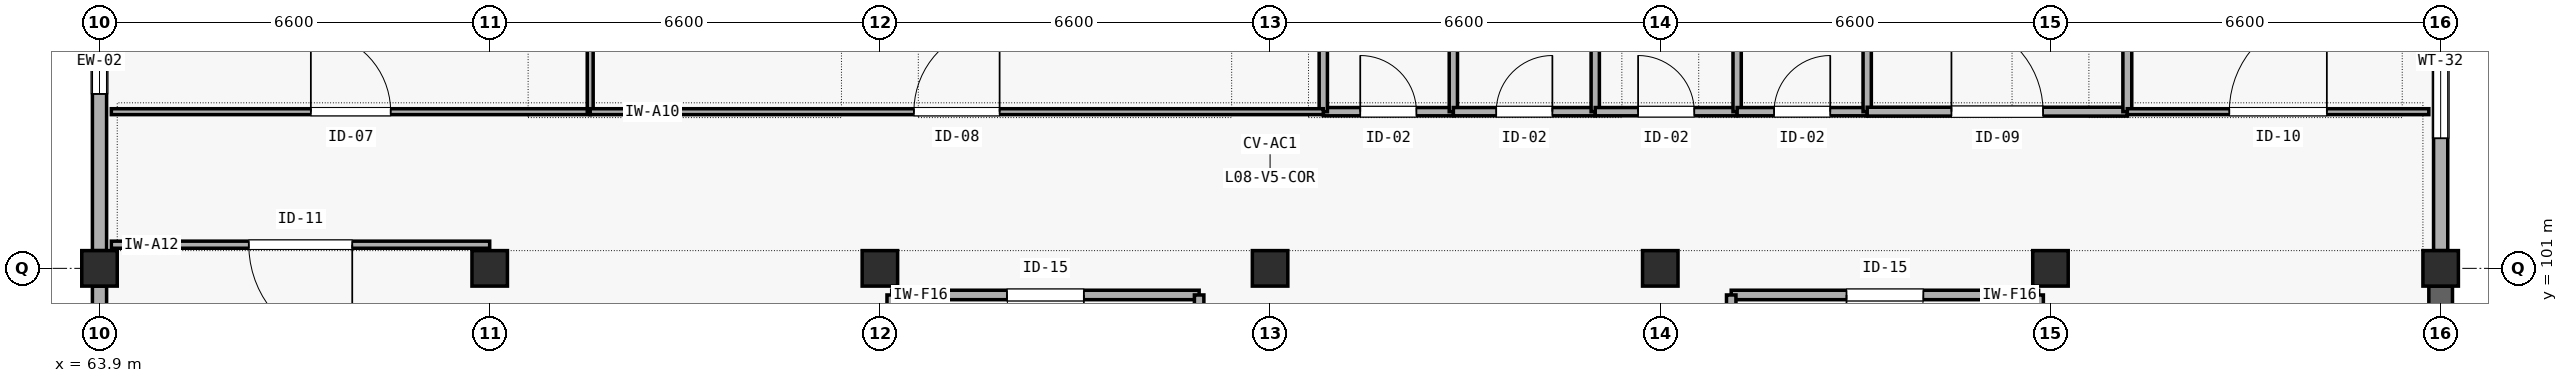
"""IFC4 building model, lengths in metres.
Left out: names, types, materials, properties, quantities, classifications, styles, units other than length and angle.
Written with IfcOpenShell. Run it as: python <this file> out.ifc"""

import sys

from ifc_helpers import new_model, si_unit, direction, frame, frame_2d, origin, origin_2d, place, context, subcontext, project, spatial, rectangle, extrude, element, fill, save


model = new_model("IFC4")
c1 = context("Model", 3, precision=1e-05, world=origin(), true_north=direction((0.0, 1.0)))
c2 = subcontext(c1, "Body", "Model", "MODEL_VIEW")
j1 = project(units=[si_unit("LENGTHUNIT", "METRE"), si_unit("PLANEANGLEUNIT", "RADIAN")], contexts=[c1])
p1 = place(None, origin())
s1 = spatial("IfcSite", under=j1, at=p1, CompositionType="ELEMENT")
p2 = place(p1, origin())
s2 = spatial("IfcBuilding", under=s1, at=p2, CompositionType="ELEMENT")
p3 = place(p2, frame((0.0, 0.0, 33.6)))
s3 = spatial("IfcBuildingStorey", under=s2, at=p3, CompositionType="ELEMENT", Elevation=33.6)
for number, where, z_axis, x_axis in (
    (1, (63.9, 101.0, 0.0), (0.0, 0.0, 1.0), (1.0, 0.0, 0.0)),
    (2, (70.5, 101.0, 0.0), (0.0, 0.0, 1.0), (1.0, 0.0, 0.0)),
    (3, (77.1, 101.0, 0.0), (0.0, 0.0, 1.0), (1.0, 0.0, 0.0)),
    (4, (83.7, 101.0, 0.0), (0.0, 0.0, 1.0), (1.0, 0.0, 0.0)),
    (5, (90.3, 101.0, 0.0), (0.0, 0.0, 1.0), (1.0, 0.0, 0.0)),
    (6, (96.9, 101.0, 0.0), (0.0, 0.0, 1.0), (1.0, 0.0, 0.0)),
    (7, (103.5, 101.0, 0.0), (0.0, 0.0, 1.0), (1.0, 0.0, 0.0)),
):
    element("IfcColumn", number, at=place(p3, frame(where, z_axis=z_axis, x_axis=x_axis)), inside=s3, PredefinedType="COLUMN", context=c2, shape_type="SweptSolid", body=[
        extrude(rectangle(XDim=0.6, YDim=0.6, at=origin_2d()), origin(), (0.0, 0.0, 1.0), 4.2),
    ])
p4 = place(p3, frame((63.9, 94.3, 0.0), z_axis=(0.0, 0.0, 1.0), x_axis=(0.0, 1.0, 0.0)))
e8 = element("IfcWall", 8, at=p4, inside=s3, PredefinedType="SOLIDWALL", context=c2, shape_type="SweptSolid", body=[
    extrude(rectangle(XDim=6.4, YDim=0.24, at=frame_2d((3.2, 0.0))), origin(), (0.0, 0.0, 1.0), 3.505),
])
p5 = place(p4, frame((1.7, 0.0, 0.85)))
e9 = element("IfcOpeningElement", 9, at=p5, cuts=e8, PredefinedType="OPENING", context=c2, shape_type="SweptSolid", body=[
    extrude(rectangle(XDim=3.0, YDim=1.6, at=frame_2d((1.5, 0.8))), frame((0.0, 0.13, 0.0), z_axis=(0.0, -1.0, 0.0), x_axis=(1.0, 0.0, 0.0)), (0.0, 0.0, 1.0), 0.26),
])
p6 = place(p3, frame((63.9, 101.3, 0.0), z_axis=(0.0, 0.0, 1.0), x_axis=(0.0, 1.0, 0.0)))
e10 = element("IfcWall", 10, at=p6, inside=s3, PredefinedType="SOLIDWALL", context=c2, shape_type="SweptSolid", body=[
    extrude(rectangle(XDim=6.4, YDim=0.24, at=frame_2d((3.2, 0.0))), origin(), (0.0, 0.0, 1.0), 3.505),
])
p7 = place(p6, frame((2.65, 0.0, 0.85)))
e11 = element("IfcOpeningElement", 11, at=p7, cuts=e10, PredefinedType="OPENING", context=c2, shape_type="SweptSolid", body=[
    extrude(rectangle(XDim=1.1, YDim=1.45, at=frame_2d((0.55, 0.725))), frame((0.0, 0.13, 0.0), z_axis=(0.0, -1.0, 0.0), x_axis=(1.0, 0.0, 0.0)), (0.0, 0.0, 1.0), 0.26),
])
p8 = place(p3, frame((103.5, 97.96, 0.0), z_axis=(0.0, 0.0, 1.0), x_axis=(0.0, 1.0, 0.0)))
e12 = element("IfcWall", 12, at=p8, inside=s3, PredefinedType="SHEAR", context=c2, shape_type="SweptSolid", body=[
    extrude(rectangle(XDim=2.74, YDim=0.4, at=frame_2d((1.37, 0.0))), origin(), (0.0, 0.0, 1.0), 3.85),
])
p9 = place(p3, frame((103.5, 101.3, 0.0), z_axis=(0.0, 0.0, 1.0), x_axis=(0.0, 1.0, 0.0)))
e13 = element("IfcWall", 13, at=p9, inside=s3, PredefinedType="SOLIDWALL", context=c2, shape_type="SweptSolid", body=[
    extrude(rectangle(XDim=6.4, YDim=0.24, at=frame_2d((3.2, 0.0))), origin(), (0.0, 0.0, 1.0), 3.465),
])
p10 = place(p9, frame((1.9, 0.0, 0.85)))
e14 = element("IfcOpeningElement", 14, at=p10, cuts=e13, PredefinedType="OPENING", context=c2, shape_type="SweptSolid", body=[
    extrude(rectangle(XDim=2.6, YDim=1.2, at=frame_2d((1.3, 0.6))), frame((0.0, 0.13, 0.0), z_axis=(0.0, -1.0, 0.0), x_axis=(1.0, 0.0, 0.0)), (0.0, 0.0, 1.0), 0.26),
])
p11 = place(p3, frame((77.3, 100.55, 0.0), z_axis=(0.0, 0.0, 1.0), x_axis=(1.0, 0.0, 0.0)))
e15 = element("IfcWall", 15, at=p11, inside=s3, PredefinedType="SOLIDWALL", context=c2, shape_type="SweptSolid", body=[
    extrude(rectangle(XDim=5.2, YDim=0.16, at=frame_2d((2.6, 0.0))), origin(), (0.0, 0.0, 1.0), 3.9),
])
p12 = place(p11, frame((1.95, 0.0, 0.0)))
e16 = element("IfcOpeningElement", 16, at=p12, cuts=e15, PredefinedType="OPENING", context=c2, shape_type="SweptSolid", body=[
    extrude(rectangle(XDim=1.3, YDim=2.15, at=frame_2d((0.65, 1.075))), frame((0.0, 0.09, 0.0), z_axis=(0.0, -1.0, 0.0), x_axis=(1.0, 0.0, 0.0)), (0.0, 0.0, 1.0), 0.18),
])
p13 = place(p3, frame((77.3, 97.5, 0.0), z_axis=(0.0, 0.0, 1.0), x_axis=(0.0, 1.0, 0.0)))
e17 = element("IfcWall", 17, at=p13, inside=s3, PredefinedType="SOLIDWALL", context=c2, shape_type="SweptSolid", body=[
    extrude(rectangle(XDim=3.05, YDim=0.16, at=frame_2d((1.525, 0.0))), origin(), (0.0, 0.0, 1.0), 3.405),
])
p14 = place(p3, frame((82.5, 97.5, 0.0), z_axis=(0.0, 0.0, 1.0), x_axis=(0.0, 1.0, 0.0)))
e18 = element("IfcWall", 18, at=p14, inside=s3, PredefinedType="SOLIDWALL", context=c2, shape_type="SweptSolid", body=[
    extrude(rectangle(XDim=3.05, YDim=0.16, at=frame_2d((1.525, 0.0))), origin(), (0.0, 0.0, 1.0), 3.9),
])
p15 = place(p3, frame((91.5, 100.55, 0.0), z_axis=(0.0, 0.0, 1.0), x_axis=(1.0, 0.0, 0.0)))
e19 = element("IfcWall", 19, at=p15, inside=s3, PredefinedType="SOLIDWALL", context=c2, shape_type="SweptSolid", body=[
    extrude(rectangle(XDim=5.2, YDim=0.16, at=frame_2d((2.6, 0.0))), origin(), (0.0, 0.0, 1.0), 3.9),
])
p16 = place(p15, frame((1.95, 0.0, 0.0)))
e20 = element("IfcOpeningElement", 20, at=p16, cuts=e19, PredefinedType="OPENING", context=c2, shape_type="SweptSolid", body=[
    extrude(rectangle(XDim=1.3, YDim=2.15, at=frame_2d((0.65, 1.075))), frame((0.0, 0.09, 0.0), z_axis=(0.0, -1.0, 0.0), x_axis=(1.0, 0.0, 0.0)), (0.0, 0.0, 1.0), 0.18),
])
p17 = place(p3, frame((91.5, 97.5, 0.0), z_axis=(0.0, 0.0, 1.0), x_axis=(0.0, 1.0, 0.0)))
e21 = element("IfcWall", 21, at=p17, inside=s3, PredefinedType="SOLIDWALL", context=c2, shape_type="SweptSolid", body=[
    extrude(rectangle(XDim=3.05, YDim=0.16, at=frame_2d((1.525, 0.0))), origin(), (0.0, 0.0, 1.0), 3.9),
])
p18 = place(p3, frame((96.7, 97.5, 0.0), z_axis=(0.0, 0.0, 1.0), x_axis=(0.0, 1.0, 0.0)))
e22 = element("IfcWall", 22, at=p18, inside=s3, PredefinedType="SOLIDWALL", context=c2, shape_type="SweptSolid", body=[
    extrude(rectangle(XDim=3.05, YDim=0.16, at=frame_2d((1.525, 0.0))), origin(), (0.0, 0.0, 1.0), 3.405),
])
p19 = place(p3, frame((84.6, 103.65, 0.0), z_axis=(0.0, 0.0, 1.0), x_axis=(1.0, 0.0, 0.0)))
e23 = element("IfcWall", 23, at=p19, inside=s3, PredefinedType="PLUMBINGWALL", context=c2, shape_type="SweptSolid", body=[
    extrude(rectangle(XDim=2.2, YDim=0.14, at=frame_2d((1.1, 0.0))), origin(), (0.0, 0.0, 1.0), 3.9),
])
p20 = place(p19, frame((0.625, 0.0, 0.0)))
e24 = element("IfcOpeningElement", 24, at=p20, cuts=e23, PredefinedType="OPENING", context=c2, shape_type="SweptSolid", body=[
    extrude(rectangle(XDim=0.95, YDim=2.1, at=frame_2d((0.475, 1.05))), frame((0.0, 0.08, 0.0), z_axis=(0.0, -1.0, 0.0), x_axis=(1.0, 0.0, 0.0)), (0.0, 0.0, 1.0), 0.16),
])
for number, where, z_axis, x_axis in (
    (25, (84.6, 103.65, 0.0), (0.0, 0.0, 1.0), (0.0, 1.0, 0.0)),
    (26, (86.8, 103.65, 0.0), (0.0, 0.0, 1.0), (0.0, 1.0, 0.0)),
):
    element("IfcWall", number, at=place(p3, frame(where, z_axis=z_axis, x_axis=x_axis)), inside=s3, PredefinedType="PLUMBINGWALL", context=c2, shape_type="SweptSolid", body=[
        extrude(rectangle(XDim=4.15, YDim=0.14, at=frame_2d((2.075, 0.0))), origin(), (0.0, 0.0, 1.0), 3.9),
    ])
p21 = place(p3, frame((86.8, 103.65, 0.0), z_axis=(0.0, 0.0, 1.0), x_axis=(1.0, 0.0, 0.0)))
e27 = element("IfcWall", 27, at=p21, inside=s3, PredefinedType="PLUMBINGWALL", context=c2, shape_type="SweptSolid", body=[
    extrude(rectangle(XDim=2.4, YDim=0.14, at=frame_2d((1.2, 0.0))), origin(), (0.0, 0.0, 1.0), 3.9),
])
p22 = place(p21, frame((0.725, 0.0, 0.0)))
e28 = element("IfcOpeningElement", 28, at=p22, cuts=e27, PredefinedType="OPENING", context=c2, shape_type="SweptSolid", body=[
    extrude(rectangle(XDim=0.95, YDim=2.1, at=frame_2d((0.475, 1.05))), frame((0.0, 0.08, 0.0), z_axis=(0.0, -1.0, 0.0), x_axis=(1.0, 0.0, 0.0)), (0.0, 0.0, 1.0), 0.16),
])
p23 = place(p3, frame((89.2, 103.65, 0.0), z_axis=(0.0, 0.0, 1.0), x_axis=(0.0, 1.0, 0.0)))
e29 = element("IfcWall", 29, at=p23, inside=s3, PredefinedType="PLUMBINGWALL", context=c2, shape_type="SweptSolid", body=[
    extrude(rectangle(XDim=4.15, YDim=0.14, at=frame_2d((2.075, 0.0))), origin(), (0.0, 0.0, 1.0), 3.9),
])
p24 = place(p3, frame((89.2, 103.65, 0.0), z_axis=(0.0, 0.0, 1.0), x_axis=(1.0, 0.0, 0.0)))
e30 = element("IfcWall", 30, at=p24, inside=s3, PredefinedType="PLUMBINGWALL", context=c2, shape_type="SweptSolid", body=[
    extrude(rectangle(XDim=2.4, YDim=0.14, at=frame_2d((1.2, 0.0))), origin(), (0.0, 0.0, 1.0), 3.9),
])
p25 = place(p24, frame((0.725, 0.0, 0.0)))
e31 = element("IfcOpeningElement", 31, at=p25, cuts=e30, PredefinedType="OPENING", context=c2, shape_type="SweptSolid", body=[
    extrude(rectangle(XDim=0.95, YDim=2.1, at=frame_2d((0.475, 1.05))), frame((0.0, 0.08, 0.0), z_axis=(0.0, -1.0, 0.0), x_axis=(1.0, 0.0, 0.0)), (0.0, 0.0, 1.0), 0.16),
])
p26 = place(p3, frame((91.6, 103.65, 0.0), z_axis=(0.0, 0.0, 1.0), x_axis=(0.0, 1.0, 0.0)))
e32 = element("IfcWall", 32, at=p26, inside=s3, PredefinedType="PLUMBINGWALL", context=c2, shape_type="SweptSolid", body=[
    extrude(rectangle(XDim=4.15, YDim=0.14, at=frame_2d((2.075, 0.0))), origin(), (0.0, 0.0, 1.0), 3.9),
])
p27 = place(p3, frame((91.6, 103.65, 0.0), z_axis=(0.0, 0.0, 1.0), x_axis=(1.0, 0.0, 0.0)))
e33 = element("IfcWall", 33, at=p27, inside=s3, PredefinedType="PLUMBINGWALL", context=c2, shape_type="SweptSolid", body=[
    extrude(rectangle(XDim=2.2, YDim=0.14, at=frame_2d((1.1, 0.0))), origin(), (0.0, 0.0, 1.0), 3.9),
])
p28 = place(p27, frame((0.625, 0.0, 0.0)))
e34 = element("IfcOpeningElement", 34, at=p28, cuts=e33, PredefinedType="OPENING", context=c2, shape_type="SweptSolid", body=[
    extrude(rectangle(XDim=0.95, YDim=2.1, at=frame_2d((0.475, 1.05))), frame((0.0, 0.08, 0.0), z_axis=(0.0, -1.0, 0.0), x_axis=(1.0, 0.0, 0.0)), (0.0, 0.0, 1.0), 0.16),
])
p29 = place(p3, frame((93.8, 103.65, 0.0), z_axis=(0.0, 0.0, 1.0), x_axis=(0.0, 1.0, 0.0)))
e35 = element("IfcWall", 35, at=p29, inside=s3, PredefinedType="PLUMBINGWALL", context=c2, shape_type="SweptSolid", body=[
    extrude(rectangle(XDim=4.15, YDim=0.14, at=frame_2d((2.075, 0.0))), origin(), (0.0, 0.0, 1.0), 3.9),
])
p30 = place(p3, frame((64.1, 103.65, 0.0), z_axis=(0.0, 0.0, 1.0), x_axis=(1.0, 0.0, 0.0)))
e36 = element("IfcWall", 36, at=p30, inside=s3, PredefinedType="PARTITIONING", context=c2, shape_type="SweptSolid", body=[
    extrude(rectangle(XDim=8.1, YDim=0.1, at=frame_2d((4.05, 0.0))), origin(), (0.0, 0.0, 1.0), 3.9),
])
p31 = place(p30, frame((3.375, 0.0, 0.0)))
e37 = element("IfcOpeningElement", 37, at=p31, cuts=e36, PredefinedType="OPENING", context=c2, shape_type="SweptSolid", body=[
    extrude(rectangle(XDim=1.35, YDim=2.2, at=frame_2d((0.675, 1.1))), frame((0.0, 0.06, 0.0), z_axis=(0.0, -1.0, 0.0), x_axis=(1.0, 0.0, 0.0)), (0.0, 0.0, 1.0), 0.12),
])
p32 = place(p3, frame((72.2, 103.65, 0.0), z_axis=(0.0, 0.0, 1.0), x_axis=(0.0, 1.0, 0.0)))
e38 = element("IfcWall", 38, at=p32, inside=s3, PredefinedType="PARTITIONING", context=c2, shape_type="SweptSolid", body=[
    extrude(rectangle(XDim=11.15, YDim=0.1, at=frame_2d((5.575, 0.0))), origin(), (0.0, 0.0, 1.0), 3.9),
])
p33 = place(p3, frame((72.2, 103.65, 0.0), z_axis=(0.0, 0.0, 1.0), x_axis=(1.0, 0.0, 0.0)))
e39 = element("IfcWall", 39, at=p33, inside=s3, PredefinedType="PARTITIONING", context=c2, shape_type="SweptSolid", body=[
    extrude(rectangle(XDim=12.4, YDim=0.1, at=frame_2d((6.2, 0.0))), origin(), (0.0, 0.0, 1.0), 3.9),
])
p34 = place(p33, frame((5.475, 0.0, 0.0)))
e40 = element("IfcOpeningElement", 40, at=p34, cuts=e39, PredefinedType="OPENING", context=c2, shape_type="SweptSolid", body=[
    extrude(rectangle(XDim=1.45, YDim=2.2, at=frame_2d((0.725, 1.1))), frame((0.0, 0.06, 0.0), z_axis=(0.0, -1.0, 0.0), x_axis=(1.0, 0.0, 0.0)), (0.0, 0.0, 1.0), 0.12),
])
p35 = place(p3, frame((93.8, 103.65, 0.0), z_axis=(0.0, 0.0, 1.0), x_axis=(1.0, 0.0, 0.0)))
e41 = element("IfcWall", 41, at=p35, inside=s3, PredefinedType="PARTITIONING", context=c2, shape_type="SweptSolid", body=[
    extrude(rectangle(XDim=4.4, YDim=0.15, at=frame_2d((2.2, 0.0))), origin(), (0.0, 0.0, 1.0), 3.9),
])
p36 = place(p35, frame((1.425, 0.0, 0.0)))
e42 = element("IfcOpeningElement", 42, at=p36, cuts=e41, PredefinedType="OPENING", context=c2, shape_type="SweptSolid", body=[
    extrude(rectangle(XDim=1.55, YDim=2.2, at=frame_2d((0.775, 1.1))), frame((0.0, 0.085, 0.0), z_axis=(0.0, -1.0, 0.0), x_axis=(1.0, 0.0, 0.0)), (0.0, 0.0, 1.0), 0.17),
])
p37 = place(p3, frame((98.2, 103.65, 0.0), z_axis=(0.0, 0.0, 1.0), x_axis=(0.0, 1.0, 0.0)))
e43 = element("IfcWall", 43, at=p37, inside=s3, PredefinedType="PARTITIONING", context=c2, shape_type="SweptSolid", body=[
    extrude(rectangle(XDim=11.15, YDim=0.15, at=frame_2d((5.575, 0.0))), origin(), (0.0, 0.0, 1.0), 3.9),
])
p38 = place(p3, frame((98.2, 103.65, 0.0), z_axis=(0.0, 0.0, 1.0), x_axis=(1.0, 0.0, 0.0)))
e44 = element("IfcWall", 44, at=p38, inside=s3, PredefinedType="PARTITIONING", context=c2, shape_type="SweptSolid", body=[
    extrude(rectangle(XDim=5.1, YDim=0.1, at=frame_2d((2.55, 0.0))), origin(), (0.0, 0.0, 1.0), 3.9),
])
p39 = place(p38, frame((1.725, 0.0, 0.0)))
e45 = element("IfcOpeningElement", 45, at=p39, cuts=e44, PredefinedType="OPENING", context=c2, shape_type="SweptSolid", body=[
    extrude(rectangle(XDim=1.65, YDim=2.25, at=frame_2d((0.825, 1.125))), frame((0.0, 0.06, 0.0), z_axis=(0.0, -1.0, 0.0), x_axis=(1.0, 0.0, 0.0)), (0.0, 0.0, 1.0), 0.12),
])
p40 = place(p3, frame((64.1, 101.4, 0.0), z_axis=(0.0, 0.0, 1.0), x_axis=(1.0, 0.0, 0.0)))
e46 = element("IfcWall", 46, at=p40, inside=s3, PredefinedType="PARTITIONING", context=c2, shape_type="SweptSolid", body=[
    extrude(rectangle(XDim=6.4, YDim=0.12, at=frame_2d((3.2, 0.0))), origin(), (0.0, 0.0, 1.0), 3.9),
])
p41 = place(p40, frame((2.325, 0.0, 0.0)))
e47 = element("IfcOpeningElement", 47, at=p41, cuts=e46, PredefinedType="OPENING", context=c2, shape_type="SweptSolid", body=[
    extrude(rectangle(XDim=1.75, YDim=2.25, at=frame_2d((0.875, 1.125))), frame((0.0, 0.07, 0.0), z_axis=(0.0, -1.0, 0.0), x_axis=(1.0, 0.0, 0.0)), (0.0, 0.0, 1.0), 0.14),
])
p42 = place(p7, origin())
e48 = element("IfcWindow", 48, at=p42, inside=s3, PartitioningType="SINGLE_PANEL", PredefinedType="WINDOW", context=c2, shape_type="SweptSolid", body=[
    extrude(rectangle(XDim=1.1, YDim=1.45, at=frame_2d((0.55, 0.725))), frame((0.0, 0.03, 0.0), z_axis=(0.0, -1.0, 0.0), x_axis=(1.0, 0.0, 0.0)), (0.0, 0.0, 1.0), 0.06),
])
fill(e11, e48)
p43 = place(p10, origin())
e49 = element("IfcWindow", 49, at=p43, inside=s3, PartitioningType="SINGLE_PANEL", PredefinedType="WINDOW", context=c2, shape_type="SweptSolid", body=[
    extrude(rectangle(XDim=2.6, YDim=1.2, at=frame_2d((1.3, 0.6))), frame((0.0, 0.03, 0.0), z_axis=(0.0, -1.0, 0.0), x_axis=(1.0, 0.0, 0.0)), (0.0, 0.0, 1.0), 0.06),
])
fill(e14, e49)
p44 = place(p12, frame((1.3, 0.0, 0.0), z_axis=(0.0, 0.0, 1.0), x_axis=(-1.0, 0.0, 0.0)))
e50 = element("IfcDoor", 50, at=p44, inside=s3, OperationType="SINGLE_SWING_LEFT", PredefinedType="DOOR", context=c2, shape_type="SweptSolid", body=[
    extrude(rectangle(XDim=1.3, YDim=2.15, at=frame_2d((0.65, 1.075))), frame((0.0, 0.025, 0.0), z_axis=(0.0, -1.0, 0.0), x_axis=(1.0, 0.0, 0.0)), (0.0, 0.0, 1.0), 0.05),
])
fill(e16, e50)
p45 = place(p16, frame((1.3, 0.0, 0.0), z_axis=(0.0, 0.0, 1.0), x_axis=(-1.0, 0.0, 0.0)))
e51 = element("IfcDoor", 51, at=p45, inside=s3, OperationType="SINGLE_SWING_RIGHT", PredefinedType="DOOR", context=c2, shape_type="SweptSolid", body=[
    extrude(rectangle(XDim=1.3, YDim=2.15, at=frame_2d((0.65, 1.075))), frame((0.0, 0.025, 0.0), z_axis=(0.0, -1.0, 0.0), x_axis=(1.0, 0.0, 0.0)), (0.0, 0.0, 1.0), 0.05),
])
fill(e20, e51)
p46 = place(p20, origin())
e52 = element("IfcDoor", 52, at=p46, inside=s3, OperationType="SINGLE_SWING_LEFT", PredefinedType="DOOR", context=c2, shape_type="SweptSolid", body=[
    extrude(rectangle(XDim=0.95, YDim=2.1, at=frame_2d((0.475, 1.05))), frame((0.0, 0.025, 0.0), z_axis=(0.0, -1.0, 0.0), x_axis=(1.0, 0.0, 0.0)), (0.0, 0.0, 1.0), 0.05),
])
fill(e24, e52)
p47 = place(p22, origin())
e53 = element("IfcDoor", 53, at=p47, inside=s3, OperationType="SINGLE_SWING_RIGHT", PredefinedType="DOOR", context=c2, shape_type="SweptSolid", body=[
    extrude(rectangle(XDim=0.95, YDim=2.1, at=frame_2d((0.475, 1.05))), frame((0.0, 0.025, 0.0), z_axis=(0.0, -1.0, 0.0), x_axis=(1.0, 0.0, 0.0)), (0.0, 0.0, 1.0), 0.05),
])
fill(e28, e53)
p48 = place(p25, origin())
e54 = element("IfcDoor", 54, at=p48, inside=s3, OperationType="SINGLE_SWING_LEFT", PredefinedType="DOOR", context=c2, shape_type="SweptSolid", body=[
    extrude(rectangle(XDim=0.95, YDim=2.1, at=frame_2d((0.475, 1.05))), frame((0.0, 0.025, 0.0), z_axis=(0.0, -1.0, 0.0), x_axis=(1.0, 0.0, 0.0)), (0.0, 0.0, 1.0), 0.05),
])
fill(e31, e54)
p49 = place(p28, origin())
e55 = element("IfcDoor", 55, at=p49, inside=s3, OperationType="SINGLE_SWING_RIGHT", PredefinedType="DOOR", context=c2, shape_type="SweptSolid", body=[
    extrude(rectangle(XDim=0.95, YDim=2.1, at=frame_2d((0.475, 1.05))), frame((0.0, 0.025, 0.0), z_axis=(0.0, -1.0, 0.0), x_axis=(1.0, 0.0, 0.0)), (0.0, 0.0, 1.0), 0.05),
])
fill(e34, e55)
p50 = place(p31, origin())
e56 = element("IfcDoor", 56, at=p50, inside=s3, OperationType="SINGLE_SWING_LEFT", PredefinedType="DOOR", context=c2, shape_type="SweptSolid", body=[
    extrude(rectangle(XDim=1.35, YDim=2.2, at=frame_2d((0.675, 1.1))), frame((0.0, 0.025, 0.0), z_axis=(0.0, -1.0, 0.0), x_axis=(1.0, 0.0, 0.0)), (0.0, 0.0, 1.0), 0.05),
])
fill(e37, e56)
p51 = place(p34, origin())
e57 = element("IfcDoor", 57, at=p51, inside=s3, OperationType="SINGLE_SWING_RIGHT", PredefinedType="DOOR", context=c2, shape_type="SweptSolid", body=[
    extrude(rectangle(XDim=1.45, YDim=2.2, at=frame_2d((0.725, 1.1))), frame((0.0, 0.025, 0.0), z_axis=(0.0, -1.0, 0.0), x_axis=(1.0, 0.0, 0.0)), (0.0, 0.0, 1.0), 0.05),
])
fill(e40, e57)
p52 = place(p36, origin())
e58 = element("IfcDoor", 58, at=p52, inside=s3, OperationType="SINGLE_SWING_LEFT", PredefinedType="DOOR", context=c2, shape_type="SweptSolid", body=[
    extrude(rectangle(XDim=1.55, YDim=2.2, at=frame_2d((0.775, 1.1))), frame((0.0, 0.025, 0.0), z_axis=(0.0, -1.0, 0.0), x_axis=(1.0, 0.0, 0.0)), (0.0, 0.0, 1.0), 0.05),
])
fill(e42, e58)
p53 = place(p39, origin())
e59 = element("IfcDoor", 59, at=p53, inside=s3, OperationType="SINGLE_SWING_RIGHT", PredefinedType="DOOR", context=c2, shape_type="SweptSolid", body=[
    extrude(rectangle(XDim=1.65, YDim=2.25, at=frame_2d((0.825, 1.125))), frame((0.0, 0.025, 0.0), z_axis=(0.0, -1.0, 0.0), x_axis=(1.0, 0.0, 0.0)), (0.0, 0.0, 1.0), 0.05),
])
fill(e45, e59)
p54 = place(p41, frame((1.75, 0.0, 0.0), z_axis=(0.0, 0.0, 1.0), x_axis=(-1.0, 0.0, 0.0)))
e60 = element("IfcDoor", 60, at=p54, inside=s3, OperationType="SINGLE_SWING_LEFT", PredefinedType="DOOR", context=c2, shape_type="SweptSolid", body=[
    extrude(rectangle(XDim=1.75, YDim=2.25, at=frame_2d((0.875, 1.125))), frame((0.0, 0.025, 0.0), z_axis=(0.0, -1.0, 0.0), x_axis=(1.0, 0.0, 0.0)), (0.0, 0.0, 1.0), 0.05),
])
fill(e47, e60)
save(model, sys.argv[1])
